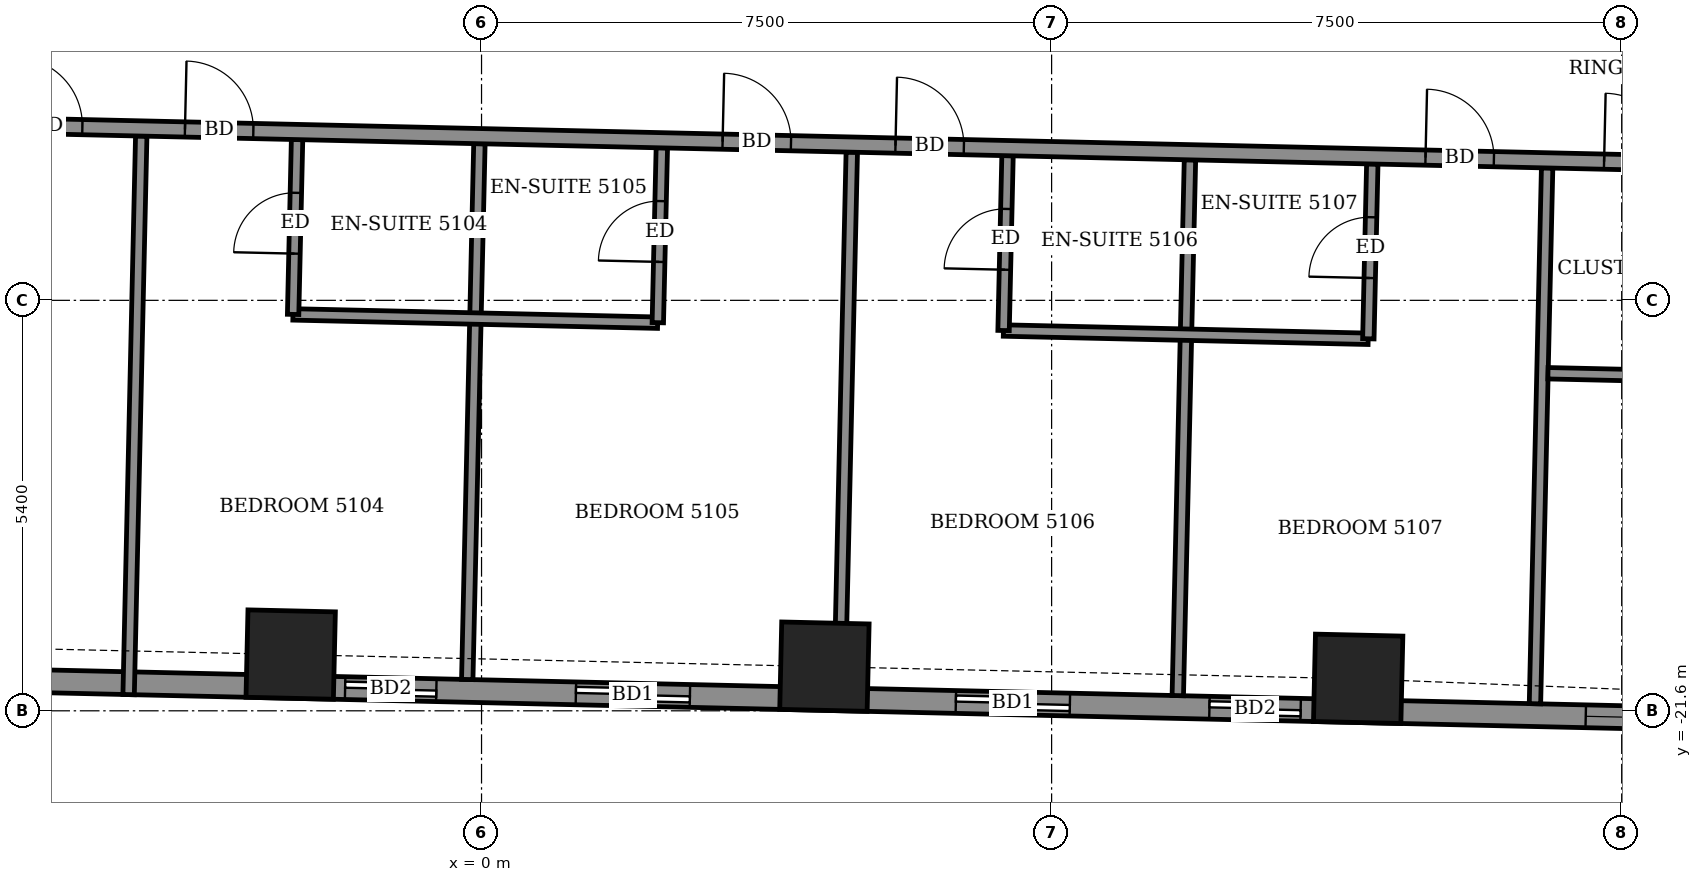
"""IFC4 building model, lengths in metres.
Left out: names, types, materials, properties, quantities, classifications, styles, units other than length and angle.
Written with IfcOpenShell. Run it as: python <this file> out.ifc"""

import sys

from ifc_helpers import new_model, si_unit, direction, frame, frame_2d, origin, origin_2d, place, context, subcontext, project, spatial, rectangle, extrude, element, fill, save


model = new_model("IFC4")
c1 = context("Model", 3, precision=1e-05, world=origin(), true_north=direction((0.0, 1.0)))
c2 = subcontext(c1, "Body", "Model", "MODEL_VIEW")
j1 = project(units=[si_unit("LENGTHUNIT", "METRE"), si_unit("PLANEANGLEUNIT", "RADIAN")], contexts=[c1])
p1 = place(None, origin())
s1 = spatial("IfcSite", under=j1, at=p1, CompositionType="ELEMENT")
p2 = place(p1, origin())
s2 = spatial("IfcBuilding", under=s1, at=p2, CompositionType="ELEMENT")
p3 = place(p2, frame((0.0, 0.0, 201.5)))
s3 = spatial("IfcBuildingStorey", under=s2, at=p3, CompositionType="ELEMENT", Elevation=201.5)
for number, where, z_axis, x_axis in (
    (1, (-2.511, -20.86, -0.55), (0.0, 0.0, 1.0), (1.0, -0.023, 0.0)),
    (2, (4.511, -21.019, -0.55), (0.0, 0.0, 1.0), (1.0, -0.023, 0.0)),
    (3, (11.533, -21.179, -0.55), (0.0, 0.0, 1.0), (1.0, -0.023, 0.0)),
):
    element("IfcColumn", number, at=place(p3, frame(where, z_axis=z_axis, x_axis=x_axis)), inside=s3, PredefinedType="COLUMN", context=c2, shape_type="SweptSolid", body=[
        extrude(rectangle(XDim=1.15, YDim=1.15, at=origin_2d()), origin(), (0.0, 0.0, 1.0), 3.6),
    ])
p4 = place(p3, frame((-23.437, -20.81, 0.0), z_axis=(0.0, 0.0, 1.0), x_axis=(0.999742269115, -0.022702320244, 0.0)))
e4 = element("IfcWall", 4, at=p4, inside=s3, PredefinedType="SOLIDWALL", context=c2, shape_type="SweptSolid", body=[
    extrude(rectangle(XDim=41.844, YDim=0.3, at=frame_2d((20.922, 0.0))), origin(), (0.0, 0.0, 1.0), 2.55),
])
p5 = place(p4, frame((1.899, 0.0, 0.0)))
e5 = element("IfcOpeningElement", 5, at=p5, cuts=e4, PredefinedType="OPENING", context=c2, shape_type="SweptSolid", body=[
    extrude(rectangle(XDim=1.5, YDim=2.4, at=frame_2d((0.75, 1.2))), frame((0.0, 0.16, 0.0), z_axis=(0.0, -1.0, 0.0), x_axis=(1.0, 0.0, 0.0)), (0.0, 0.0, 1.0), 0.32),
])
p6 = place(p4, frame((7.575, 0.0, 0.0)))
e6 = element("IfcOpeningElement", 6, at=p6, cuts=e4, PredefinedType="OPENING", context=c2, shape_type="SweptSolid", body=[
    extrude(rectangle(XDim=1.2, YDim=2.4, at=frame_2d((0.6, 1.2))), frame((0.0, 0.16, 0.0), z_axis=(0.0, -1.0, 0.0), x_axis=(1.0, 0.0, 0.0)), (0.0, 0.0, 1.0), 0.32),
])
p7 = place(p4, frame((10.612, 0.0, 0.0)))
e7 = element("IfcOpeningElement", 7, at=p7, cuts=e4, PredefinedType="OPENING", context=c2, shape_type="SweptSolid", body=[
    extrude(rectangle(XDim=1.5, YDim=2.4, at=frame_2d((0.75, 1.2))), frame((0.0, 0.16, 0.0), z_axis=(0.0, -1.0, 0.0), x_axis=(1.0, 0.0, 0.0)), (0.0, 0.0, 1.0), 0.32),
])
p8 = place(p4, frame((15.762, 0.0, 0.0)))
e8 = element("IfcOpeningElement", 8, at=p8, cuts=e4, PredefinedType="OPENING", context=c2, shape_type="SweptSolid", body=[
    extrude(rectangle(XDim=1.5, YDim=2.4, at=frame_2d((0.75, 1.2))), frame((0.0, 0.16, 0.0), z_axis=(0.0, -1.0, 0.0), x_axis=(1.0, 0.0, 0.0)), (0.0, 0.0, 1.0), 0.32),
])
p9 = place(p4, frame((21.648, 0.0, 0.0)))
e9 = element("IfcOpeningElement", 9, at=p9, cuts=e4, PredefinedType="OPENING", context=c2, shape_type="SweptSolid", body=[
    extrude(rectangle(XDim=1.2, YDim=2.4, at=frame_2d((0.6, 1.2))), frame((0.0, 0.16, 0.0), z_axis=(0.0, -1.0, 0.0), x_axis=(1.0, 0.0, 0.0)), (0.0, 0.0, 1.0), 0.32),
])
p10 = place(p4, frame((24.685, 0.0, 0.0)))
e10 = element("IfcOpeningElement", 10, at=p10, cuts=e4, PredefinedType="OPENING", context=c2, shape_type="SweptSolid", body=[
    extrude(rectangle(XDim=1.5, YDim=2.4, at=frame_2d((0.75, 1.2))), frame((0.0, 0.16, 0.0), z_axis=(0.0, -1.0, 0.0), x_axis=(1.0, 0.0, 0.0)), (0.0, 0.0, 1.0), 0.32),
])
p11 = place(p4, frame((29.685, 0.0, 0.0)))
e11 = element("IfcOpeningElement", 11, at=p11, cuts=e4, PredefinedType="OPENING", context=c2, shape_type="SweptSolid", body=[
    extrude(rectangle(XDim=1.5, YDim=2.4, at=frame_2d((0.75, 1.2))), frame((0.0, 0.16, 0.0), z_axis=(0.0, -1.0, 0.0), x_axis=(1.0, 0.0, 0.0)), (0.0, 0.0, 1.0), 0.32),
])
p12 = place(p4, frame((33.022, 0.0, 0.0)))
e12 = element("IfcOpeningElement", 12, at=p12, cuts=e4, PredefinedType="OPENING", context=c2, shape_type="SweptSolid", body=[
    extrude(rectangle(XDim=1.2, YDim=2.4, at=frame_2d((0.6, 1.2))), frame((0.0, 0.16, 0.0), z_axis=(0.0, -1.0, 0.0), x_axis=(1.0, 0.0, 0.0)), (0.0, 0.0, 1.0), 0.32),
])
p13 = place(p4, frame((37.974, 0.0, 0.9)))
e13 = element("IfcOpeningElement", 13, at=p13, cuts=e4, PredefinedType="OPENING", context=c2, shape_type="SweptSolid", body=[
    extrude(rectangle(XDim=2.4, YDim=1.5, at=frame_2d((1.2, 0.75))), frame((0.0, 0.16, 0.0), z_axis=(0.0, -1.0, 0.0), x_axis=(1.0, 0.0, 0.0)), (0.0, 0.0, 1.0), 0.32),
])
p14 = place(p3, frame((-4.643, -21.387, 0.0), z_axis=(0.0, 0.0, 1.0), x_axis=(0.022587849492, 0.99974486198, 0.0)))
e14 = element("IfcWall", 14, at=p14, inside=s3, PredefinedType="PARTITIONING", context=c2, shape_type="SweptSolid", body=[
    extrude(rectangle(XDim=7.35, YDim=0.15, at=frame_2d((3.675, 0.0))), origin(), (0.0, 0.0, 1.0), 2.55),
])
p15 = place(p3, frame((-0.188, -21.188, 0.0), z_axis=(0.0, 0.0, 1.0), x_axis=(0.022682859663, 0.99974271084, 0.0)))
e15 = element("IfcWall", 15, at=p15, inside=s3, PredefinedType="PARTITIONING", context=c2, shape_type="SweptSolid", body=[
    extrude(rectangle(XDim=7.05, YDim=0.15, at=frame_2d((3.525, 0.0))), origin(), (0.0, 0.0, 1.0), 2.55),
])
p16 = place(p3, frame((4.711, -21.299, 0.0), z_axis=(0.0, 0.0, 1.0), x_axis=(0.022717472124, 0.999741924929, 0.0)))
e16 = element("IfcWall", 16, at=p16, inside=s3, PredefinedType="PARTITIONING", context=c2, shape_type="SweptSolid", body=[
    extrude(rectangle(XDim=7.05, YDim=0.15, at=frame_2d((3.525, 0.0))), origin(), (0.0, 0.0, 1.0), 3.05),
])
p17 = place(p3, frame((9.16, -21.4, 0.0), z_axis=(0.0, 0.0, 1.0), x_axis=(0.022718258661, 0.999741907056, 0.0)))
e17 = element("IfcWall", 17, at=p17, inside=s3, PredefinedType="PARTITIONING", context=c2, shape_type="SweptSolid", body=[
    extrude(rectangle(XDim=7.05, YDim=0.15, at=frame_2d((3.525, 0.0))), origin(), (0.0, 0.0, 1.0), 2.55),
])
p18 = place(p3, frame((13.859, -21.507, 0.0), z_axis=(0.0, 0.0, 1.0), x_axis=(0.022714326521, 0.999741996402, 0.0)))
e18 = element("IfcWall", 18, at=p18, inside=s3, PredefinedType="PARTITIONING", context=c2, shape_type="SweptSolid", body=[
    extrude(rectangle(XDim=7.051, YDim=0.15, at=frame_2d((3.525, 0.0))), origin(), (0.0, 0.0, 1.0), 2.55),
])
p19 = place(p3, frame((14.03, -17.159, 0.0), z_axis=(0.0, 0.0, 1.0), x_axis=(0.999740478815, -0.022781023197, 0.0)))
e19 = element("IfcWall", 19, at=p19, inside=s3, PredefinedType="PARTITIONING", context=c2, shape_type="SweptSolid", body=[
    extrude(rectangle(XDim=2.325, YDim=0.15, at=frame_2d((1.163, 0.0))), origin(), (0.0, 0.0, 1.0), 3.05),
])
p20 = place(p3, frame((-2.481, -16.385, 0.0), z_axis=(0.0, 0.0, 1.0), x_axis=(0.999742570398, -0.022689048768, 0.0)))
e20 = element("IfcWall", 20, at=p20, inside=s3, PredefinedType="PARTITIONING", context=c2, shape_type="SweptSolid", body=[
    extrude(rectangle(XDim=4.799, YDim=0.15, at=frame_2d((2.399, 0.0))), origin(), (0.0, 0.0, 1.0), 3.05),
])
p21 = place(p3, frame((-2.479, -16.385, 0.0), z_axis=(0.0, 0.0, 1.0), x_axis=(0.022603288534, 0.999744513037, 0.0)))
e21 = element("IfcWall", 21, at=p21, inside=s3, PredefinedType="PARTITIONING", context=c2, shape_type="SweptSolid", body=[
    extrude(rectangle(XDim=2.301, YDim=0.15, at=frame_2d((1.15, 0.0))), origin(), (0.0, 0.0, 1.0), 3.05),
])
p22 = place(p21, frame((0.8, 0.0, 0.0)))
e22 = element("IfcOpeningElement", 22, at=p22, cuts=e21, PredefinedType="OPENING", context=c2, shape_type="SweptSolid", body=[
    extrude(rectangle(XDim=0.8, YDim=2.1, at=frame_2d((0.4, 1.05))), frame((0.0, 0.085, 0.0), z_axis=(0.0, -1.0, 0.0), x_axis=(1.0, 0.0, 0.0)), (0.0, 0.0, 1.0), 0.17),
])
p23 = place(p3, frame((2.319, -16.494, 0.0), z_axis=(0.0, 0.0, 1.0), x_axis=(0.023029983665, 0.999734774754, 0.0)))
e23 = element("IfcWall", 23, at=p23, inside=s3, PredefinedType="PARTITIONING", context=c2, shape_type="SweptSolid", body=[
    extrude(rectangle(XDim=2.3, YDim=0.15, at=frame_2d((1.15, 0.0))), origin(), (0.0, 0.0, 1.0), 3.05),
])
p24 = place(p23, frame((0.8, 0.0, 0.0)))
e24 = element("IfcOpeningElement", 24, at=p24, cuts=e23, PredefinedType="OPENING", context=c2, shape_type="SweptSolid", body=[
    extrude(rectangle(XDim=0.8, YDim=2.1, at=frame_2d((0.4, 1.05))), frame((0.0, 0.085, 0.0), z_axis=(0.0, -1.0, 0.0), x_axis=(1.0, 0.0, 0.0)), (0.0, 0.0, 1.0), 0.17),
])
p25 = place(p3, frame((6.866, -16.597, 0.0), z_axis=(0.0, 0.0, 1.0), x_axis=(0.99974154664, -0.022734113616, 0.0)))
e25 = element("IfcWall", 25, at=p25, inside=s3, PredefinedType="PARTITIONING", context=c2, shape_type="SweptSolid", body=[
    extrude(rectangle(XDim=4.8, YDim=0.15, at=frame_2d((2.4, 0.0))), origin(), (0.0, 0.0, 1.0), 3.05),
])
p26 = place(p3, frame((6.868, -16.597, 0.0), z_axis=(0.0, 0.0, 1.0), x_axis=(0.022605686808, 0.999744458811, 0.0)))
e26 = element("IfcWall", 26, at=p26, inside=s3, PredefinedType="PARTITIONING", context=c2, shape_type="SweptSolid", body=[
    extrude(rectangle(XDim=2.3, YDim=0.15, at=frame_2d((1.15, 0.0))), origin(), (0.0, 0.0, 1.0), 3.05),
])
p27 = place(p26, frame((0.8, 0.0, 0.0)))
e27 = element("IfcOpeningElement", 27, at=p27, cuts=e26, PredefinedType="OPENING", context=c2, shape_type="SweptSolid", body=[
    extrude(rectangle(XDim=0.8, YDim=2.1, at=frame_2d((0.4, 1.05))), frame((0.0, 0.085, 0.0), z_axis=(0.0, -1.0, 0.0), x_axis=(1.0, 0.0, 0.0)), (0.0, 0.0, 1.0), 0.17),
])
p28 = place(p3, frame((11.667, -16.706, 0.0), z_axis=(0.0, 0.0, 1.0), x_axis=(0.022603288534, 0.999744513037, 0.0)))
e28 = element("IfcWall", 28, at=p28, inside=s3, PredefinedType="PARTITIONING", context=c2, shape_type="SweptSolid", body=[
    extrude(rectangle(XDim=2.301, YDim=0.15, at=frame_2d((1.15, 0.0))), origin(), (0.0, 0.0, 1.0), 3.05),
])
p29 = place(p28, frame((0.8, 0.0, 0.0)))
e29 = element("IfcOpeningElement", 29, at=p29, cuts=e28, PredefinedType="OPENING", context=c2, shape_type="SweptSolid", body=[
    extrude(rectangle(XDim=0.8, YDim=2.1, at=frame_2d((0.4, 1.05))), frame((0.0, 0.085, 0.0), z_axis=(0.0, -1.0, 0.0), x_axis=(1.0, 0.0, 0.0)), (0.0, 0.0, 1.0), 0.17),
])
p30 = place(p3, frame((-26.421, -13.441, 0.0), z_axis=(0.0, 0.0, 1.0), x_axis=(0.999742754064, -0.022680954485, 0.0)))
e30 = element("IfcWall", 30, at=p30, inside=s3, PredefinedType="PARTITIONING", context=c2, shape_type="SweptSolid", body=[
    extrude(rectangle(XDim=48.945, YDim=0.2, at=frame_2d((24.472, 0.0))), origin(), (0.0, 0.0, 1.0), 3.05),
])
p31 = place(p30, frame((1.375, 0.0, 0.0)))
e31 = element("IfcOpeningElement", 31, at=p31, cuts=e30, PredefinedType="OPENING", context=c2, shape_type="SweptSolid", body=[
    extrude(rectangle(XDim=1.0, YDim=2.1, at=frame_2d((0.5, 1.05))), frame((0.0, 0.11, 0.0), z_axis=(0.0, -1.0, 0.0), x_axis=(1.0, 0.0, 0.0)), (0.0, 0.0, 1.0), 0.22),
])
p32 = place(p30, frame((6.0, 0.0, 0.0)))
e32 = element("IfcOpeningElement", 32, at=p32, cuts=e30, PredefinedType="OPENING", context=c2, shape_type="SweptSolid", body=[
    extrude(rectangle(XDim=0.9, YDim=2.1, at=frame_2d((0.45, 1.05))), frame((0.0, 0.11, 0.0), z_axis=(0.0, -1.0, 0.0), x_axis=(1.0, 0.0, 0.0)), (0.0, 0.0, 1.0), 0.22),
])
p33 = place(p30, frame((10.775, 0.0, 0.0)))
e33 = element("IfcOpeningElement", 33, at=p33, cuts=e30, PredefinedType="OPENING", context=c2, shape_type="SweptSolid", body=[
    extrude(rectangle(XDim=0.9, YDim=2.1, at=frame_2d((0.45, 1.05))), frame((0.0, 0.11, 0.0), z_axis=(0.0, -1.0, 0.0), x_axis=(1.0, 0.0, 0.0)), (0.0, 0.0, 1.0), 0.22),
])
p34 = place(p30, frame((13.05, 0.0, 0.0)))
e34 = element("IfcOpeningElement", 34, at=p34, cuts=e30, PredefinedType="OPENING", context=c2, shape_type="SweptSolid", body=[
    extrude(rectangle(XDim=0.9, YDim=2.1, at=frame_2d((0.45, 1.05))), frame((0.0, 0.11, 0.0), z_axis=(0.0, -1.0, 0.0), x_axis=(1.0, 0.0, 0.0)), (0.0, 0.0, 1.0), 0.22),
])
p35 = place(p30, frame((20.275, 0.0, 0.0)))
e35 = element("IfcOpeningElement", 35, at=p35, cuts=e30, PredefinedType="OPENING", context=c2, shape_type="SweptSolid", body=[
    extrude(rectangle(XDim=0.9, YDim=2.1, at=frame_2d((0.45, 1.05))), frame((0.0, 0.11, 0.0), z_axis=(0.0, -1.0, 0.0), x_axis=(1.0, 0.0, 0.0)), (0.0, 0.0, 1.0), 0.22),
])
p36 = place(p30, frame((22.525, 0.0, 0.0)))
e36 = element("IfcOpeningElement", 36, at=p36, cuts=e30, PredefinedType="OPENING", context=c2, shape_type="SweptSolid", body=[
    extrude(rectangle(XDim=0.9, YDim=2.1, at=frame_2d((0.45, 1.05))), frame((0.0, 0.11, 0.0), z_axis=(0.0, -1.0, 0.0), x_axis=(1.0, 0.0, 0.0)), (0.0, 0.0, 1.0), 0.22),
])
p37 = place(p30, frame((29.6, 0.0, 0.0)))
e37 = element("IfcOpeningElement", 37, at=p37, cuts=e30, PredefinedType="OPENING", context=c2, shape_type="SweptSolid", body=[
    extrude(rectangle(XDim=0.9, YDim=2.1, at=frame_2d((0.45, 1.05))), frame((0.0, 0.11, 0.0), z_axis=(0.0, -1.0, 0.0), x_axis=(1.0, 0.0, 0.0)), (0.0, 0.0, 1.0), 0.22),
])
p38 = place(p30, frame((31.875, 0.0, 0.0)))
e38 = element("IfcOpeningElement", 38, at=p38, cuts=e30, PredefinedType="OPENING", context=c2, shape_type="SweptSolid", body=[
    extrude(rectangle(XDim=0.9, YDim=2.1, at=frame_2d((0.45, 1.05))), frame((0.0, 0.11, 0.0), z_axis=(0.0, -1.0, 0.0), x_axis=(1.0, 0.0, 0.0)), (0.0, 0.0, 1.0), 0.22),
])
p39 = place(p30, frame((38.85, 0.0, 0.0)))
e39 = element("IfcOpeningElement", 39, at=p39, cuts=e30, PredefinedType="OPENING", context=c2, shape_type="SweptSolid", body=[
    extrude(rectangle(XDim=0.9, YDim=2.1, at=frame_2d((0.45, 1.05))), frame((0.0, 0.11, 0.0), z_axis=(0.0, -1.0, 0.0), x_axis=(1.0, 0.0, 0.0)), (0.0, 0.0, 1.0), 0.22),
])
p40 = place(p30, frame((46.097, 0.0, 0.0)))
e40 = element("IfcOpeningElement", 40, at=p40, cuts=e30, PredefinedType="OPENING", context=c2, shape_type="SweptSolid", body=[
    extrude(rectangle(XDim=1.0, YDim=2.1, at=frame_2d((0.5, 1.05))), frame((0.0, 0.11, 0.0), z_axis=(0.0, -1.0, 0.0), x_axis=(1.0, 0.0, 0.0)), (0.0, 0.0, 1.0), 0.22),
])
p41 = place(p30, frame((41.2, 0.0, 0.0)))
e41 = element("IfcOpeningElement", 41, at=p41, cuts=e30, PredefinedType="OPENING", context=c2, shape_type="SweptSolid", body=[
    extrude(rectangle(XDim=0.9, YDim=2.1, at=frame_2d((0.45, 1.05))), frame((0.0, 0.11, 0.0), z_axis=(0.0, -1.0, 0.0), x_axis=(1.0, 0.0, 0.0)), (0.0, 0.0, 1.0), 0.22),
])
p42 = place(p9, origin())
e42 = element("IfcDoor", 42, at=p42, inside=s3, OperationType="SLIDING_TO_LEFT", PredefinedType="DOOR", context=c2, shape_type="SweptSolid", body=[
    extrude(rectangle(XDim=1.2, YDim=2.4, at=frame_2d((0.6, 1.2))), frame((0.0, 0.025, 0.0), z_axis=(0.0, -1.0, 0.0), x_axis=(1.0, 0.0, 0.0)), (0.0, 0.0, 1.0), 0.05),
])
fill(e9, e42)
p43 = place(p10, origin())
e43 = element("IfcDoor", 43, at=p43, inside=s3, OperationType="SLIDING_TO_LEFT", PredefinedType="DOOR", context=c2, shape_type="SweptSolid", body=[
    extrude(rectangle(XDim=1.5, YDim=2.4, at=frame_2d((0.75, 1.2))), frame((0.0, 0.025, 0.0), z_axis=(0.0, -1.0, 0.0), x_axis=(1.0, 0.0, 0.0)), (0.0, 0.0, 1.0), 0.05),
])
fill(e10, e43)
p44 = place(p11, origin())
e44 = element("IfcDoor", 44, at=p44, inside=s3, OperationType="SLIDING_TO_LEFT", PredefinedType="DOOR", context=c2, shape_type="SweptSolid", body=[
    extrude(rectangle(XDim=1.5, YDim=2.4, at=frame_2d((0.75, 1.2))), frame((0.0, 0.025, 0.0), z_axis=(0.0, -1.0, 0.0), x_axis=(1.0, 0.0, 0.0)), (0.0, 0.0, 1.0), 0.05),
])
fill(e11, e44)
p45 = place(p12, origin())
e45 = element("IfcDoor", 45, at=p45, inside=s3, OperationType="SLIDING_TO_LEFT", PredefinedType="DOOR", context=c2, shape_type="SweptSolid", body=[
    extrude(rectangle(XDim=1.2, YDim=2.4, at=frame_2d((0.6, 1.2))), frame((0.0, 0.025, 0.0), z_axis=(0.0, -1.0, 0.0), x_axis=(1.0, 0.0, 0.0)), (0.0, 0.0, 1.0), 0.05),
])
fill(e12, e45)
p46 = place(p13, origin())
e46 = element("IfcWindow", 46, at=p46, inside=s3, PartitioningType="DOUBLE_PANEL_VERTICAL", PredefinedType="WINDOW", context=c2, shape_type="SweptSolid", body=[
    extrude(rectangle(XDim=2.4, YDim=1.5, at=frame_2d((1.2, 0.75))), frame((0.0, 0.03, 0.0), z_axis=(0.0, -1.0, 0.0), x_axis=(1.0, 0.0, 0.0)), (0.0, 0.0, 1.0), 0.06),
])
fill(e13, e46)
p47 = place(p35, origin())
e47 = element("IfcDoor", 47, at=p47, inside=s3, OperationType="SINGLE_SWING_LEFT", PredefinedType="DOOR", context=c2, shape_type="SweptSolid", body=[
    extrude(rectangle(XDim=0.9, YDim=2.1, at=frame_2d((0.45, 1.05))), frame((0.0, 0.025, 0.0), z_axis=(0.0, -1.0, 0.0), x_axis=(1.0, 0.0, 0.0)), (0.0, 0.0, 1.0), 0.05),
])
fill(e35, e47)
p48 = place(p36, origin())
e48 = element("IfcDoor", 48, at=p48, inside=s3, OperationType="SINGLE_SWING_RIGHT", PredefinedType="DOOR", context=c2, shape_type="SweptSolid", body=[
    extrude(rectangle(XDim=0.9, YDim=2.1, at=frame_2d((0.45, 1.05))), frame((0.0, 0.025, 0.0), z_axis=(0.0, -1.0, 0.0), x_axis=(1.0, 0.0, 0.0)), (0.0, 0.0, 1.0), 0.05),
])
fill(e36, e48)
p49 = place(p22, origin())
e49 = element("IfcDoor", 49, at=p49, inside=s3, OperationType="SINGLE_SWING_RIGHT", PredefinedType="DOOR", context=c2, shape_type="SweptSolid", body=[
    extrude(rectangle(XDim=0.8, YDim=2.1, at=frame_2d((0.4, 1.05))), frame((0.0, 0.025, 0.0), z_axis=(0.0, -1.0, 0.0), x_axis=(1.0, 0.0, 0.0)), (0.0, 0.0, 1.0), 0.05),
])
fill(e22, e49)
p50 = place(p37, origin())
e50 = element("IfcDoor", 50, at=p50, inside=s3, OperationType="SINGLE_SWING_LEFT", PredefinedType="DOOR", context=c2, shape_type="SweptSolid", body=[
    extrude(rectangle(XDim=0.9, YDim=2.1, at=frame_2d((0.45, 1.05))), frame((0.0, 0.025, 0.0), z_axis=(0.0, -1.0, 0.0), x_axis=(1.0, 0.0, 0.0)), (0.0, 0.0, 1.0), 0.05),
])
fill(e37, e50)
p51 = place(p24, origin())
e51 = element("IfcDoor", 51, at=p51, inside=s3, OperationType="SINGLE_SWING_LEFT", PredefinedType="DOOR", context=c2, shape_type="SweptSolid", body=[
    extrude(rectangle(XDim=0.8, YDim=2.1, at=frame_2d((0.4, 1.05))), frame((0.0, 0.025, 0.0), z_axis=(0.0, -1.0, 0.0), x_axis=(1.0, 0.0, 0.0)), (0.0, 0.0, 1.0), 0.05),
])
fill(e24, e51)
p52 = place(p38, origin())
e52 = element("IfcDoor", 52, at=p52, inside=s3, OperationType="SINGLE_SWING_RIGHT", PredefinedType="DOOR", context=c2, shape_type="SweptSolid", body=[
    extrude(rectangle(XDim=0.9, YDim=2.1, at=frame_2d((0.45, 1.05))), frame((0.0, 0.025, 0.0), z_axis=(0.0, -1.0, 0.0), x_axis=(1.0, 0.0, 0.0)), (0.0, 0.0, 1.0), 0.05),
])
fill(e38, e52)
p53 = place(p27, origin())
e53 = element("IfcDoor", 53, at=p53, inside=s3, OperationType="SINGLE_SWING_RIGHT", PredefinedType="DOOR", context=c2, shape_type="SweptSolid", body=[
    extrude(rectangle(XDim=0.8, YDim=2.1, at=frame_2d((0.4, 1.05))), frame((0.0, 0.025, 0.0), z_axis=(0.0, -1.0, 0.0), x_axis=(1.0, 0.0, 0.0)), (0.0, 0.0, 1.0), 0.05),
])
fill(e27, e53)
p54 = place(p39, origin())
e54 = element("IfcDoor", 54, at=p54, inside=s3, OperationType="SINGLE_SWING_LEFT", PredefinedType="DOOR", context=c2, shape_type="SweptSolid", body=[
    extrude(rectangle(XDim=0.9, YDim=2.1, at=frame_2d((0.45, 1.05))), frame((0.0, 0.025, 0.0), z_axis=(0.0, -1.0, 0.0), x_axis=(1.0, 0.0, 0.0)), (0.0, 0.0, 1.0), 0.05),
])
fill(e39, e54)
p55 = place(p29, origin())
e55 = element("IfcDoor", 55, at=p55, inside=s3, OperationType="SINGLE_SWING_LEFT", PredefinedType="DOOR", context=c2, shape_type="SweptSolid", body=[
    extrude(rectangle(XDim=0.8, YDim=2.1, at=frame_2d((0.4, 1.05))), frame((0.0, 0.025, 0.0), z_axis=(0.0, -1.0, 0.0), x_axis=(1.0, 0.0, 0.0)), (0.0, 0.0, 1.0), 0.05),
])
fill(e29, e55)
p56 = place(p41, origin())
e56 = element("IfcDoor", 56, at=p56, inside=s3, OperationType="SINGLE_SWING_RIGHT", PredefinedType="DOOR", context=c2, shape_type="SweptSolid", body=[
    extrude(rectangle(XDim=0.9, YDim=2.1, at=frame_2d((0.45, 1.05))), frame((0.0, 0.025, 0.0), z_axis=(0.0, -1.0, 0.0), x_axis=(1.0, 0.0, 0.0)), (0.0, 0.0, 1.0), 0.05),
])
fill(e41, e56)
save(model, sys.argv[1])
